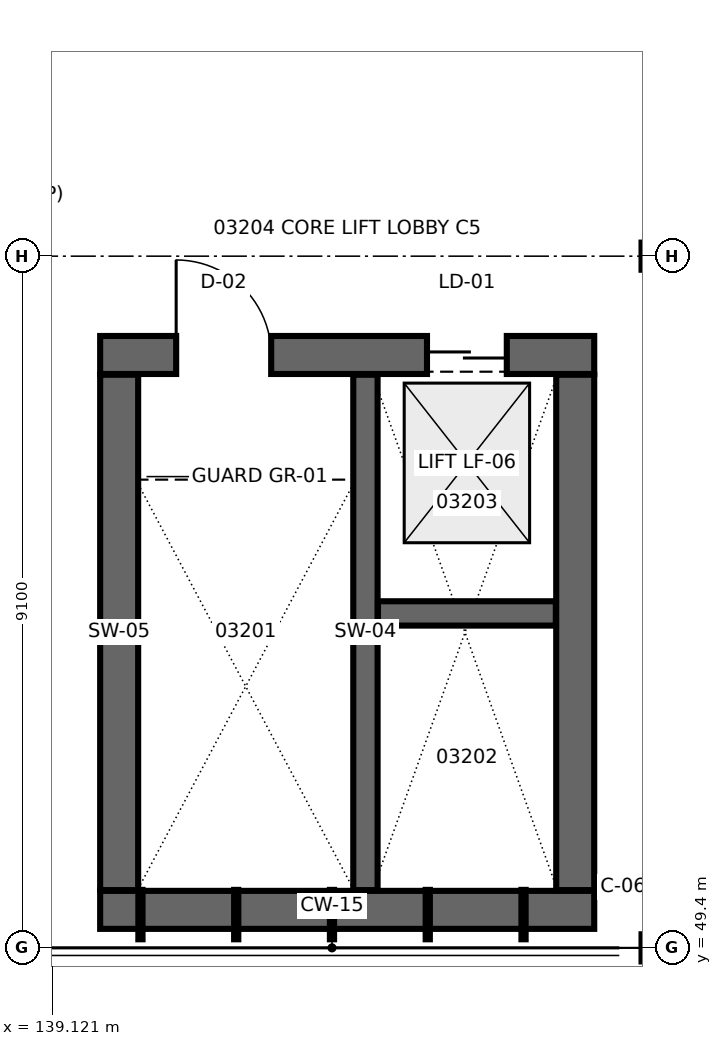
"""IFC4 building model, lengths in metres.
Left out: names, types, materials, properties, quantities, classifications, styles, units other than length and angle.
Written with IfcOpenShell. Run it as: python <this file> out.ifc"""

import sys

from ifc_helpers import new_model, si_unit, direction, frame, frame_2d, origin, origin_2d, place, context, subcontext, project, spatial, rectangle, i_section, extrude, element, fill, save


model = new_model("IFC4")
c1 = context("Model", 3, precision=1e-05, world=origin(), true_north=direction((0.0, 1.0)))
c2 = subcontext(c1, "Body", "Model", "MODEL_VIEW")
j1 = project(units=[si_unit("LENGTHUNIT", "METRE"), si_unit("PLANEANGLEUNIT", "RADIAN")], contexts=[c1])
p1 = place(None, origin())
s1 = spatial("IfcSite", under=j1, at=p1, CompositionType="ELEMENT")
p2 = place(p1, origin())
s2 = spatial("IfcBuilding", under=s1, at=p2, CompositionType="ELEMENT")
p3 = place(p2, frame((0.0, 0.0, 13.8)))
s3 = spatial("IfcBuildingStorey", under=s2, at=p3, CompositionType="ELEMENT", Elevation=13.8)
for number, where, z_axis, x_axis in (
    (1, (147.0, 49.4, 0.0), (0.0, 0.0, 1.0), (1.0, 0.0, 0.0)),
    (2, (147.0, 58.5, 0.0), (0.0, 0.0, 1.0), (1.0, 0.0, 0.0)),
):
    element("IfcColumn", number, at=place(p3, frame(where, z_axis=z_axis, x_axis=x_axis)), inside=s3, PredefinedType="COLUMN", context=c2, shape_type="SweptSolid", body=[
        extrude(i_section(OverallWidth=0.255, OverallDepth=0.357, WebThickness=0.01, FlangeThickness=0.018, at=origin_2d()), origin(), (0.0, 0.0, 1.0), 3.9),
    ])
p4 = place(p3, frame((139.75, 49.9, 0.0), z_axis=(0.0, 0.0, 1.0), x_axis=(1.0, 0.0, 0.0)))
e3 = element("IfcWall", 3, at=p4, inside=s3, PredefinedType="SHEAR", context=c2, shape_type="SweptSolid", body=[
    extrude(rectangle(XDim=6.5, YDim=0.5, at=frame_2d((3.25, 0.0))), origin(), (0.0, 0.0, 1.0), 3.62),
])
p5 = place(p3, frame((139.75, 57.2, 0.0), z_axis=(0.0, 0.0, 1.0), x_axis=(1.0, 0.0, 0.0)))
e4 = element("IfcWall", 4, at=p5, inside=s3, PredefinedType="SHEAR", context=c2, shape_type="SweptSolid", body=[
    extrude(rectangle(XDim=6.5, YDim=0.5, at=frame_2d((3.25, 0.0))), origin(), (0.0, 0.0, 1.0), 3.62),
])
p6 = place(p5, frame((1.0, 0.0, 0.0)))
e5 = element("IfcOpeningElement", 5, at=p6, cuts=e4, PredefinedType="OPENING", context=c2, shape_type="SweptSolid", body=[
    extrude(rectangle(XDim=1.25, YDim=2.2, at=frame_2d((0.625, 1.1))), frame((0.0, 0.26, 0.0), z_axis=(0.0, -1.0, 0.0), x_axis=(1.0, 0.0, 0.0)), (0.0, 0.0, 1.0), 0.52),
])
p7 = place(p5, frame((4.3, 0.0, 0.0)))
e6 = element("IfcOpeningElement", 6, at=p7, cuts=e4, PredefinedType="OPENING", context=c2, shape_type="SweptSolid", body=[
    extrude(rectangle(XDim=1.05, YDim=2.15, at=frame_2d((0.525, 1.075))), frame((0.0, 0.26, 0.0), z_axis=(0.0, -1.0, 0.0), x_axis=(1.0, 0.0, 0.0)), (0.0, 0.0, 1.0), 0.52),
])
for number, where, z_axis, x_axis in (
    (7, (140.0, 50.16, 0.0), (0.0, 0.0, 1.0), (0.0, 1.0, 0.0)),
    (8, (146.0, 50.16, 0.0), (0.0, 0.0, 1.0), (0.0, 1.0, 0.0)),
):
    element("IfcWall", number, at=place(p3, frame(where, z_axis=z_axis, x_axis=x_axis)), inside=s3, PredefinedType="SHEAR", context=c2, shape_type="SweptSolid", body=[
        extrude(rectangle(XDim=6.78, YDim=0.5, at=frame_2d((3.39, 0.0))), origin(), (0.0, 0.0, 1.0), 3.62),
    ])
p8 = place(p3, frame((143.24, 50.16, 0.0), z_axis=(0.0, 0.0, 1.0), x_axis=(0.0, 1.0, 0.0)))
e9 = element("IfcWall", 9, at=p8, inside=s3, PredefinedType="SHEAR", context=c2, shape_type="SweptSolid", body=[
    extrude(rectangle(XDim=6.78, YDim=0.32, at=frame_2d((3.39, 0.0))), origin(), (0.0, 0.0, 1.0), 3.62),
])
p9 = place(p3, frame((143.405, 53.8, 0.0), z_axis=(0.0, 0.0, 1.0), x_axis=(1.0, 0.0, 0.0)))
e10 = element("IfcWall", 10, at=p9, inside=s3, PredefinedType="SHEAR", context=c2, shape_type="SweptSolid", body=[
    extrude(rectangle(XDim=2.34, YDim=0.32, at=frame_2d((1.17, 0.0))), origin(), (0.0, 0.0, 1.0), 3.62),
])
p10 = place(p6, origin())
e11 = element("IfcDoor", 11, at=p10, inside=s3, OperationType="SINGLE_SWING_LEFT", PredefinedType="DOOR", context=c2, shape_type="SweptSolid", body=[
    extrude(rectangle(XDim=1.25, YDim=2.2, at=frame_2d((0.625, 1.1))), frame((0.0, 0.025, 0.0), z_axis=(0.0, -1.0, 0.0), x_axis=(1.0, 0.0, 0.0)), (0.0, 0.0, 1.0), 0.05),
])
fill(e5, e11)
p11 = place(p7, origin())
e12 = element("IfcDoor", 12, at=p11, inside=s3, OperationType="DOUBLE_DOOR_SLIDING", PredefinedType="DOOR", context=c2, shape_type="SweptSolid", body=[
    extrude(rectangle(XDim=1.05, YDim=2.15, at=frame_2d((0.525, 1.075))), frame((0.0, 0.025, 0.0), z_axis=(0.0, -1.0, 0.0), x_axis=(1.0, 0.0, 0.0)), (0.0, 0.0, 1.0), 0.05),
])
fill(e6, e12)
save(model, sys.argv[1])
